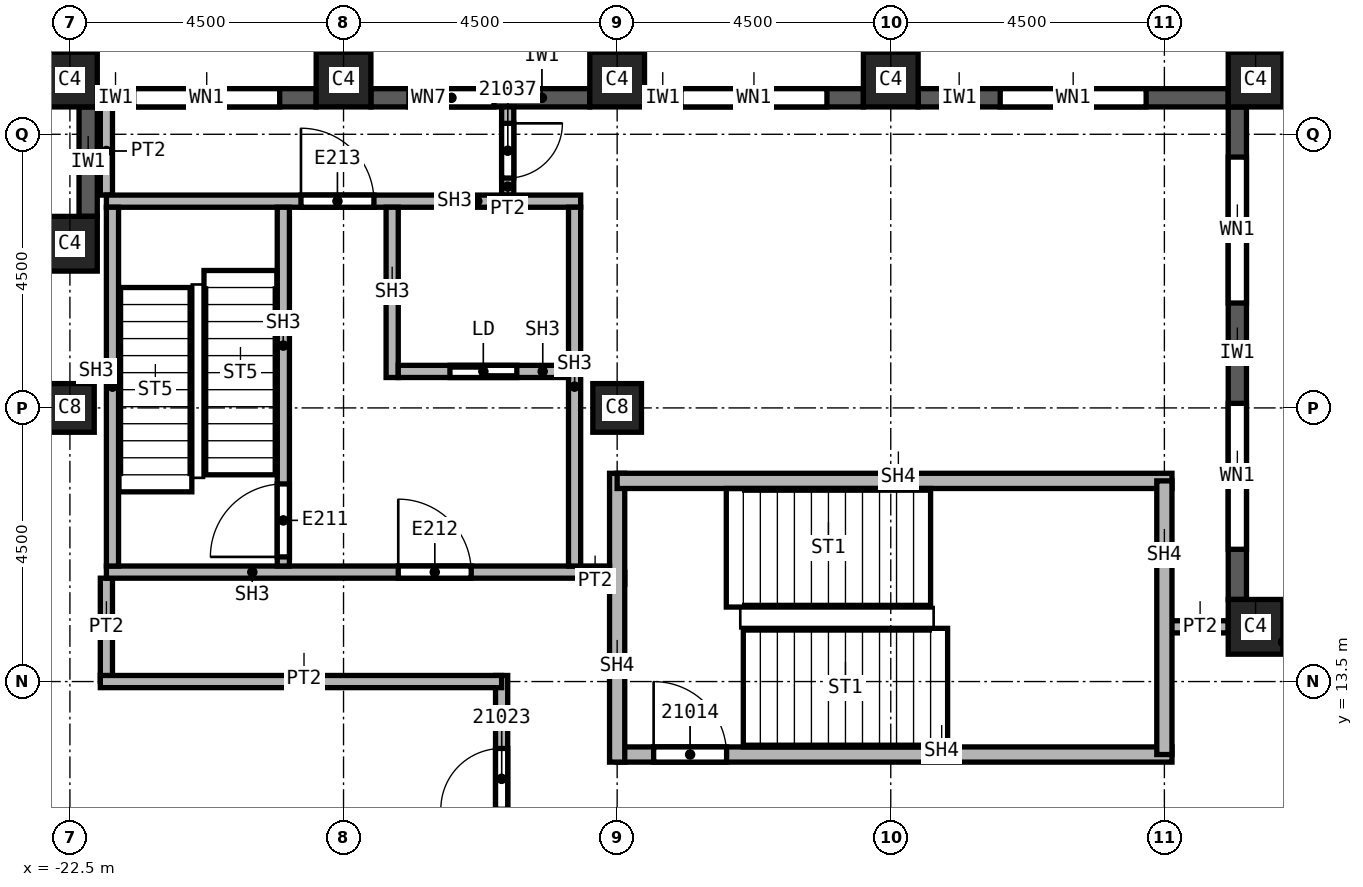
"""IFC4 building model, lengths in metres.
Left out: names, types, materials, properties, quantities, classifications, styles, units other than length and angle.
Written with IfcOpenShell. Run it as: python <this file> out.ifc"""

import sys

from ifc_helpers import new_model, si_unit, direction, frame, frame_2d, origin, origin_2d, place, context, subcontext, project, spatial, rectangle, extrude, element, fill, save


model = new_model("IFC4")
c1 = context("Model", 3, precision=1e-05, world=origin(), true_north=direction((0.0, 1.0)))
c2 = subcontext(c1, "Body", "Model", "MODEL_VIEW")
j1 = project(units=[si_unit("LENGTHUNIT", "METRE"), si_unit("PLANEANGLEUNIT", "RADIAN")], contexts=[c1])
p1 = place(None, origin())
s1 = spatial("IfcSite", under=j1, at=p1, CompositionType="ELEMENT")
p2 = place(p1, origin())
s2 = spatial("IfcBuilding", under=s1, at=p2, CompositionType="ELEMENT")
p3 = place(p2, frame((0.0, 0.0, 308.0)))
s3 = spatial("IfcBuildingStorey", under=s2, at=p3, CompositionType="ELEMENT", Elevation=308.0)
for number, where, z_axis, x_axis in (
    (1, (-13.5, 18.0, 0.0), (0.0, 0.0, 1.0), (1.0, 0.0, 0.0)),
    (2, (-22.5, 18.0, 0.0), (0.0, 0.0, 1.0), (1.0, 0.0, 0.0)),
):
    element("IfcColumn", number, at=place(p3, frame(where, z_axis=z_axis, x_axis=x_axis)), inside=s3, PredefinedType="COLUMN", context=c2, shape_type="SweptSolid", body=[
        extrude(rectangle(XDim=0.8, YDim=0.8, at=origin_2d()), origin(), (0.0, 0.0, 1.0), 3.74),
    ])
for number, where, z_axis, x_axis in (
    (3, (-3.0, 23.4, 0.0), (0.0, 0.0, 1.0), (1.0, 0.0, 0.0)),
    (4, (-9.0, 23.4, 0.0), (0.0, 0.0, 1.0), (1.0, 0.0, 0.0)),
    (5, (-13.5, 23.4, 0.0), (0.0, 0.0, 1.0), (1.0, 0.0, 0.0)),
    (6, (-18.0, 23.4, 0.0), (0.0, 0.0, 1.0), (1.0, 0.0, 0.0)),
    (7, (-22.5, 23.4, 0.0), (0.0, 0.0, 1.0), (1.0, 0.0, 0.0)),
    (8, (-3.0, 14.4, 0.0), (0.0, 0.0, 1.0), (1.0, 0.0, 0.0)),
    (9, (-22.5, 20.7, 0.0), (0.0, 0.0, 1.0), (1.0, 0.0, 0.0)),
):
    element("IfcColumn", number, at=place(p3, frame(where, z_axis=z_axis, x_axis=x_axis)), inside=s3, PredefinedType="COLUMN", context=c2, shape_type="SweptSolid", body=[
        extrude(rectangle(XDim=0.9, YDim=0.9, at=origin_2d()), origin(), (0.0, 0.0, 1.0), 3.74),
    ])
p4 = place(p3, frame((-3.3, 14.85, 0.0), z_axis=(0.0, 0.0, 1.0), x_axis=(0.0, 1.0, 0.0)))
e10 = element("IfcWall", 10, at=p4, inside=s3, PredefinedType="SOLIDWALL", context=c2, shape_type="SweptSolid", body=[
    extrude(rectangle(XDim=8.1, YDim=0.3, at=frame_2d((4.05, 0.0))), origin(), (0.0, 0.0, 1.0), 3.14),
])
p5 = place(p4, frame((0.825, 0.0, 0.8)))
e11 = element("IfcOpeningElement", 11, at=p5, cuts=e10, PredefinedType="OPENING", context=c2, shape_type="SweptSolid", body=[
    extrude(rectangle(XDim=2.4, YDim=1.95, at=frame_2d((1.2, 0.975))), frame((0.0, 0.15, 0.0), z_axis=(0.0, -1.0, 0.0), x_axis=(1.0, 0.0, 0.0)), (0.0, 0.0, 1.0), 0.3),
])
p6 = place(p4, frame((4.875, 0.0, 0.8)))
e12 = element("IfcOpeningElement", 12, at=p6, cuts=e10, PredefinedType="OPENING", context=c2, shape_type="SweptSolid", body=[
    extrude(rectangle(XDim=2.4, YDim=1.95, at=frame_2d((1.2, 0.975))), frame((0.0, 0.15, 0.0), z_axis=(0.0, -1.0, 0.0), x_axis=(1.0, 0.0, 0.0)), (0.0, 0.0, 1.0), 0.3),
])
p7 = place(p3, frame((-3.45, 23.1, 0.0), z_axis=(0.0, 0.0, 1.0), x_axis=(-1.0, 0.0, 0.0)))
e13 = element("IfcWall", 13, at=p7, inside=s3, PredefinedType="SOLIDWALL", context=c2, shape_type="SweptSolid", body=[
    extrude(rectangle(XDim=5.1, YDim=0.3, at=frame_2d((2.55, 0.0))), origin(), (0.0, 0.0, 1.0), 3.14),
])
p8 = place(p7, frame((1.35, 0.0, 0.8)))
e14 = element("IfcOpeningElement", 14, at=p8, cuts=e13, PredefinedType="OPENING", context=c2, shape_type="SweptSolid", body=[
    extrude(rectangle(XDim=2.4, YDim=1.95, at=frame_2d((1.2, 0.975))), frame((0.0, 0.15, 0.0), z_axis=(0.0, -1.0, 0.0), x_axis=(1.0, 0.0, 0.0)), (0.0, 0.0, 1.0), 0.3),
])
p9 = place(p3, frame((-9.45, 23.1, 0.0), z_axis=(0.0, 0.0, 1.0), x_axis=(-1.0, 0.0, 0.0)))
e15 = element("IfcWall", 15, at=p9, inside=s3, PredefinedType="SOLIDWALL", context=c2, shape_type="SweptSolid", body=[
    extrude(rectangle(XDim=3.6, YDim=0.3, at=frame_2d((1.8, 0.0))), origin(), (0.0, 0.0, 1.0), 3.14),
])
p10 = place(p9, frame((0.6, 0.0, 0.8)))
e16 = element("IfcOpeningElement", 16, at=p10, cuts=e15, PredefinedType="OPENING", context=c2, shape_type="SweptSolid", body=[
    extrude(rectangle(XDim=2.4, YDim=1.95, at=frame_2d((1.2, 0.975))), frame((0.0, 0.15, 0.0), z_axis=(0.0, -1.0, 0.0), x_axis=(1.0, 0.0, 0.0)), (0.0, 0.0, 1.0), 0.3),
])
p11 = place(p3, frame((-13.95, 23.1, 0.0), z_axis=(0.0, 0.0, 1.0), x_axis=(-1.0, 0.0, 0.0)))
e17 = element("IfcWall", 17, at=p11, inside=s3, PredefinedType="SOLIDWALL", context=c2, shape_type="SweptSolid", body=[
    extrude(rectangle(XDim=3.6, YDim=0.3, at=frame_2d((1.8, 0.0))), origin(), (0.0, 0.0, 1.0), 3.14),
])
p12 = place(p11, frame((1.575, 0.0, 0.8)))
e18 = element("IfcOpeningElement", 18, at=p12, cuts=e17, PredefinedType="OPENING", context=c2, shape_type="SweptSolid", body=[
    extrude(rectangle(XDim=1.4, YDim=1.95, at=frame_2d((0.7, 0.975))), frame((0.0, 0.15, 0.0), z_axis=(0.0, -1.0, 0.0), x_axis=(1.0, 0.0, 0.0)), (0.0, 0.0, 1.0), 0.3),
])
p13 = place(p3, frame((-18.45, 23.1, 0.0), z_axis=(0.0, 0.0, 1.0), x_axis=(-1.0, 0.0, 0.0)))
e19 = element("IfcWall", 19, at=p13, inside=s3, PredefinedType="SOLIDWALL", context=c2, shape_type="SweptSolid", body=[
    extrude(rectangle(XDim=3.6, YDim=0.3, at=frame_2d((1.8, 0.0))), origin(), (0.0, 0.0, 1.0), 3.14),
])
p14 = place(p13, frame((0.6, 0.0, 0.8)))
e20 = element("IfcOpeningElement", 20, at=p14, cuts=e19, PredefinedType="OPENING", context=c2, shape_type="SweptSolid", body=[
    extrude(rectangle(XDim=2.4, YDim=1.95, at=frame_2d((1.2, 0.975))), frame((0.0, 0.15, 0.0), z_axis=(0.0, -1.0, 0.0), x_axis=(1.0, 0.0, 0.0)), (0.0, 0.0, 1.0), 0.3),
])
p15 = place(p3, frame((-22.2, 22.95, 0.0), z_axis=(0.0, 0.0, 1.0), x_axis=(0.0, -1.0, 0.0)))
e21 = element("IfcWall", 21, at=p15, inside=s3, PredefinedType="SOLIDWALL", context=c2, shape_type="SweptSolid", body=[
    extrude(rectangle(XDim=1.8, YDim=0.3, at=frame_2d((0.9, 0.0))), origin(), (0.0, 0.0, 1.0), 3.14),
])
p16 = place(p3, frame((-21.9, 13.5, 0.0), z_axis=(0.0, 0.0, 1.0), x_axis=(0.0, 1.0, 0.0)))
e22 = element("IfcWall", 22, at=p16, inside=s3, PredefinedType="PARTITIONING", context=c2, shape_type="SweptSolid", body=[
    extrude(rectangle(XDim=1.7, YDim=0.2, at=frame_2d((0.85, 0.0))), origin(), (0.0, 0.0, 1.0), 3.74),
])
p17 = place(p3, frame((-21.9, 21.5, 0.0), z_axis=(0.0, 0.0, 1.0), x_axis=(0.0, 1.0, 0.0)))
e23 = element("IfcWall", 23, at=p17, inside=s3, PredefinedType="PARTITIONING", context=c2, shape_type="SweptSolid", body=[
    extrude(rectangle(XDim=1.45, YDim=0.2, at=frame_2d((0.725, 0.0))), origin(), (0.0, 0.0, 1.0), 3.74),
])
p18 = place(p3, frame((-15.4, -22.95, 0.0), z_axis=(0.0, 0.0, 1.0), x_axis=(0.0, 1.0, 0.0)))
e24 = element("IfcWall", 24, at=p18, inside=s3, PredefinedType="PARTITIONING", context=c2, shape_type="SweptSolid", body=[
    extrude(rectangle(XDim=36.55, YDim=0.2, at=frame_2d((18.275, 0.0))), origin(), (0.0, 0.0, 1.0), 3.74),
])
p19 = place(p18, frame((23.1, 0.0, 0.0)))
e25 = element("IfcOpeningElement", 25, at=p19, cuts=e24, PredefinedType="OPENING", context=c2, shape_type="SweptSolid", body=[
    extrude(rectangle(XDim=1.0, YDim=2.1, at=frame_2d((0.5, 1.05))), frame((0.0, 0.1, 0.0), z_axis=(0.0, -1.0, 0.0), x_axis=(1.0, 0.0, 0.0)), (0.0, 0.0, 1.0), 0.2),
])
p20 = place(p18, frame((34.35, 0.0, 0.0)))
e26 = element("IfcOpeningElement", 26, at=p20, cuts=e24, PredefinedType="OPENING", context=c2, shape_type="SweptSolid", body=[
    extrude(rectangle(XDim=1.0, YDim=2.1, at=frame_2d((0.5, 1.05))), frame((0.0, 0.1, 0.0), z_axis=(0.0, -1.0, 0.0), x_axis=(1.0, 0.0, 0.0)), (0.0, 0.0, 1.0), 0.2),
])
p21 = place(p18, frame((2.95, 0.0, 0.0)))
e27 = element("IfcOpeningElement", 27, at=p21, cuts=e24, PredefinedType="OPENING", context=c2, shape_type="SweptSolid", body=[
    extrude(rectangle(XDim=1.0, YDim=2.1, at=frame_2d((0.5, 1.05))), frame((0.0, 0.1, 0.0), z_axis=(0.0, -1.0, 0.0), x_axis=(1.0, 0.0, 0.0)), (0.0, 0.0, 1.0), 0.2),
])
p22 = place(p18, frame((6.15, 0.0, 0.0)))
e28 = element("IfcOpeningElement", 28, at=p22, cuts=e24, PredefinedType="OPENING", context=c2, shape_type="SweptSolid", body=[
    extrude(rectangle(XDim=1.0, YDim=2.1, at=frame_2d((0.5, 1.05))), frame((0.0, 0.1, 0.0), z_axis=(0.0, -1.0, 0.0), x_axis=(1.0, 0.0, 0.0)), (0.0, 0.0, 1.0), 0.2),
])
p23 = place(p18, frame((8.625, 0.0, 0.0)))
e29 = element("IfcOpeningElement", 29, at=p23, cuts=e24, PredefinedType="OPENING", context=c2, shape_type="SweptSolid", body=[
    extrude(rectangle(XDim=1.0, YDim=2.1, at=frame_2d((0.5, 1.05))), frame((0.0, 0.1, 0.0), z_axis=(0.0, -1.0, 0.0), x_axis=(1.0, 0.0, 0.0)), (0.0, 0.0, 1.0), 0.2),
])
p24 = place(p18, frame((15.0, 0.0, 0.0)))
e30 = element("IfcOpeningElement", 30, at=p24, cuts=e24, PredefinedType="OPENING", context=c2, shape_type="SweptSolid", body=[
    extrude(rectangle(XDim=1.0, YDim=2.1, at=frame_2d((0.5, 1.05))), frame((0.0, 0.1, 0.0), z_axis=(0.0, -1.0, 0.0), x_axis=(1.0, 0.0, 0.0)), (0.0, 0.0, 1.0), 0.2),
])
p25 = place(p3, frame((-15.4, 13.5, 0.0), z_axis=(0.0, 0.0, 1.0), x_axis=(-1.0, 0.0, 0.0)))
e31 = element("IfcWall", 31, at=p25, inside=s3, PredefinedType="PARTITIONING", context=c2, shape_type="SweptSolid", body=[
    extrude(rectangle(XDim=6.6, YDim=0.2, at=frame_2d((3.3, 0.0))), origin(), (0.0, 0.0, 1.0), 3.74),
])
p26 = place(p3, frame((-15.3, 22.95, 0.0), z_axis=(0.0, 0.0, 1.0), x_axis=(0.0, -1.0, 0.0)))
e32 = element("IfcWall", 32, at=p26, inside=s3, PredefinedType="PARTITIONING", context=c2, shape_type="SweptSolid", body=[
    extrude(rectangle(XDim=1.45, YDim=0.2, at=frame_2d((0.725, 0.0))), origin(), (0.0, 0.0, 1.0), 3.74),
])
p27 = place(p26, frame((0.27, 0.0, 0.0)))
e33 = element("IfcOpeningElement", 33, at=p27, cuts=e32, PredefinedType="OPENING", context=c2, shape_type="SweptSolid", body=[
    extrude(rectangle(XDim=0.9, YDim=2.1, at=frame_2d((0.45, 1.05))), frame((0.0, 0.1, 0.0), z_axis=(0.0, -1.0, 0.0), x_axis=(1.0, 0.0, 0.0)), (0.0, 0.0, 1.0), 0.2),
])
p28 = place(p3, frame((-14.1, 15.2, 0.0), z_axis=(0.0, 0.0, 1.0), x_axis=(1.0, 0.0, 0.0)))
e34 = element("IfcWall", 34, at=p28, inside=s3, PredefinedType="PARTITIONING", context=c2, shape_type="SweptSolid", body=[
    extrude(rectangle(XDim=0.725, YDim=0.2, at=frame_2d((0.363, 0.0))), origin(), (0.0, 0.0, 1.0), 3.74),
])
p29 = place(p3, frame((-4.5, 14.4, 0.0), z_axis=(0.0, 0.0, 1.0), x_axis=(1.0, 0.0, 0.0)))
e35 = element("IfcWall", 35, at=p29, inside=s3, PredefinedType="PARTITIONING", context=c2, shape_type="SweptSolid", body=[
    extrude(rectangle(XDim=1.05, YDim=0.2, at=frame_2d((0.525, 0.0))), origin(), (0.0, 0.0, 1.0), 3.74),
])
p30 = place(p3, frame((-13.5, 12.3, 0.0), z_axis=(0.0, 0.0, 1.0), x_axis=(1.0, 0.0, 0.0)))
e36 = element("IfcWall", 36, at=p30, inside=s3, PredefinedType="SOLIDWALL", context=c2, shape_type="SweptSolid", body=[
    extrude(rectangle(XDim=9.125, YDim=0.25, at=frame_2d((4.562, 0.0))), origin(), (0.0, 0.0, 1.0), 3.74),
])
p31 = place(p30, frame((0.6, 0.0, 0.0)))
e37 = element("IfcOpeningElement", 37, at=p31, cuts=e36, PredefinedType="OPENING", context=c2, shape_type="SweptSolid", body=[
    extrude(rectangle(XDim=1.2, YDim=2.1, at=frame_2d((0.6, 1.05))), frame((0.0, 0.125, 0.0), z_axis=(0.0, -1.0, 0.0), x_axis=(1.0, 0.0, 0.0)), (0.0, 0.0, 1.0), 0.25),
])
p32 = place(p3, frame((-13.5, 12.175, 0.0), z_axis=(0.0, 0.0, 1.0), x_axis=(0.0, 1.0, 0.0)))
e38 = element("IfcWall", 38, at=p32, inside=s3, PredefinedType="SOLIDWALL", context=c2, shape_type="SweptSolid", body=[
    extrude(rectangle(XDim=4.75, YDim=0.25, at=frame_2d((2.375, 0.0))), origin(), (0.0, 0.0, 1.0), 3.74),
])
p33 = place(p3, frame((-13.5, 16.8, 0.0), z_axis=(0.0, 0.0, 1.0), x_axis=(1.0, 0.0, 0.0)))
e39 = element("IfcWall", 39, at=p33, inside=s3, PredefinedType="SOLIDWALL", context=c2, shape_type="SweptSolid", body=[
    extrude(rectangle(XDim=9.125, YDim=0.25, at=frame_2d((4.562, 0.0))), origin(), (0.0, 0.0, 1.0), 3.74),
])
p34 = place(p3, frame((-4.5, 16.8, 0.0), z_axis=(0.0, 0.0, 1.0), x_axis=(0.0, -1.0, 0.0)))
e40 = element("IfcWall", 40, at=p34, inside=s3, PredefinedType="SOLIDWALL", context=c2, shape_type="SweptSolid", body=[
    extrude(rectangle(XDim=4.5, YDim=0.25, at=frame_2d((2.25, 0.0))), origin(), (0.0, 0.0, 1.0), 3.74),
])
p35 = place(p3, frame((-21.9, 15.3, 0.0), z_axis=(0.0, 0.0, 1.0), x_axis=(1.0, 0.0, 0.0)))
e41 = element("IfcWall", 41, at=p35, inside=s3, PredefinedType="SOLIDWALL", context=c2, shape_type="SweptSolid", body=[
    extrude(rectangle(XDim=8.275, YDim=0.2, at=frame_2d((4.137, 0.0))), origin(), (0.0, 0.0, 1.0), 3.74),
])
p36 = place(p35, frame((4.8, 0.0, 0.0)))
e42 = element("IfcOpeningElement", 42, at=p36, cuts=e41, PredefinedType="OPENING", context=c2, shape_type="SweptSolid", body=[
    extrude(rectangle(XDim=1.2, YDim=2.1, at=frame_2d((0.6, 1.05))), frame((0.0, 0.1, 0.0), z_axis=(0.0, -1.0, 0.0), x_axis=(1.0, 0.0, 0.0)), (0.0, 0.0, 1.0), 0.2),
])
p37 = place(p3, frame((-21.9, 21.4, 0.0), z_axis=(0.0, 0.0, 1.0), x_axis=(1.0, 0.0, 0.0)))
e43 = element("IfcWall", 43, at=p37, inside=s3, PredefinedType="SOLIDWALL", context=c2, shape_type="SweptSolid", body=[
    extrude(rectangle(XDim=7.8, YDim=0.2, at=frame_2d((3.9, 0.0))), origin(), (0.0, 0.0, 1.0), 3.74),
])
p38 = place(p37, frame((3.2, 0.0, 0.0)))
e44 = element("IfcOpeningElement", 44, at=p38, cuts=e43, PredefinedType="OPENING", context=c2, shape_type="SweptSolid", body=[
    extrude(rectangle(XDim=1.2, YDim=2.1, at=frame_2d((0.6, 1.05))), frame((0.0, 0.1, 0.0), z_axis=(0.0, -1.0, 0.0), x_axis=(1.0, 0.0, 0.0)), (0.0, 0.0, 1.0), 0.2),
])
for number, where, z_axis, x_axis in (
    (45, (-21.8, 15.4, 0.0), (0.0, 0.0, 1.0), (0.0, 1.0, 0.0)),
    (46, (-14.2, 15.4, 0.0), (0.0, 0.0, 1.0), (0.0, 1.0, 0.0)),
):
    element("IfcWall", number, at=place(p3, frame(where, z_axis=z_axis, x_axis=x_axis)), inside=s3, PredefinedType="SOLIDWALL", context=c2, shape_type="SweptSolid", body=[
        extrude(rectangle(XDim=5.9, YDim=0.2, at=frame_2d((2.95, 0.0))), origin(), (0.0, 0.0, 1.0), 3.74),
    ])
p39 = place(p3, frame((-18.99, 15.4, 0.0), z_axis=(0.0, 0.0, 1.0), x_axis=(0.0, 1.0, 0.0)))
e47 = element("IfcWall", 47, at=p39, inside=s3, PredefinedType="SOLIDWALL", context=c2, shape_type="SweptSolid", body=[
    extrude(rectangle(XDim=5.9, YDim=0.2, at=frame_2d((2.95, 0.0))), origin(), (0.0, 0.0, 1.0), 3.74),
])
p40 = place(p39, frame((0.15, 0.0, 0.0)))
e48 = element("IfcOpeningElement", 48, at=p40, cuts=e47, PredefinedType="OPENING", context=c2, shape_type="SweptSolid", body=[
    extrude(rectangle(XDim=1.2, YDim=2.1, at=frame_2d((0.6, 1.05))), frame((0.0, 0.1, 0.0), z_axis=(0.0, -1.0, 0.0), x_axis=(1.0, 0.0, 0.0)), (0.0, 0.0, 1.0), 0.2),
])
p41 = place(p3, frame((-17.2, 18.5, 0.0), z_axis=(0.0, 0.0, 1.0), x_axis=(0.0, 1.0, 0.0)))
e49 = element("IfcWall", 49, at=p41, inside=s3, PredefinedType="SOLIDWALL", context=c2, shape_type="SweptSolid", body=[
    extrude(rectangle(XDim=2.8, YDim=0.2, at=frame_2d((1.4, 0.0))), origin(), (0.0, 0.0, 1.0), 3.74),
])
p42 = place(p3, frame((-17.1, 18.6, 0.0), z_axis=(0.0, 0.0, 1.0), x_axis=(1.0, 0.0, 0.0)))
e50 = element("IfcWall", 50, at=p42, inside=s3, PredefinedType="SOLIDWALL", context=c2, shape_type="SweptSolid", body=[
    extrude(rectangle(XDim=2.8, YDim=0.2, at=frame_2d((1.4, 0.0))), origin(), (0.0, 0.0, 1.0), 3.74),
])
p43 = place(p42, frame((0.85, 0.0, 0.0)))
e51 = element("IfcOpeningElement", 51, at=p43, cuts=e50, PredefinedType="OPENING", context=c2, shape_type="SweptSolid", body=[
    extrude(rectangle(XDim=1.1, YDim=2.1, at=frame_2d((0.55, 1.05))), frame((0.0, 0.1, 0.0), z_axis=(0.0, -1.0, 0.0), x_axis=(1.0, 0.0, 0.0)), (0.0, 0.0, 1.0), 0.2),
])
p44 = place(p5, origin())
e52 = element("IfcWindow", 52, at=p44, inside=s3, PartitioningType="SINGLE_PANEL", PredefinedType="WINDOW", context=c2, shape_type="SweptSolid", body=[
    extrude(rectangle(XDim=2.4, YDim=1.95, at=frame_2d((1.2, 0.975))), frame((0.0, 0.03, 0.0), z_axis=(0.0, -1.0, 0.0), x_axis=(1.0, 0.0, 0.0)), (0.0, 0.0, 1.0), 0.06),
])
fill(e11, e52)
p45 = place(p6, origin())
e53 = element("IfcWindow", 53, at=p45, inside=s3, PartitioningType="SINGLE_PANEL", PredefinedType="WINDOW", context=c2, shape_type="SweptSolid", body=[
    extrude(rectangle(XDim=2.4, YDim=1.95, at=frame_2d((1.2, 0.975))), frame((0.0, 0.03, 0.0), z_axis=(0.0, -1.0, 0.0), x_axis=(1.0, 0.0, 0.0)), (0.0, 0.0, 1.0), 0.06),
])
fill(e12, e53)
p46 = place(p8, origin())
e54 = element("IfcWindow", 54, at=p46, inside=s3, PartitioningType="SINGLE_PANEL", PredefinedType="WINDOW", context=c2, shape_type="SweptSolid", body=[
    extrude(rectangle(XDim=2.4, YDim=1.95, at=frame_2d((1.2, 0.975))), frame((0.0, 0.03, 0.0), z_axis=(0.0, -1.0, 0.0), x_axis=(1.0, 0.0, 0.0)), (0.0, 0.0, 1.0), 0.06),
])
fill(e14, e54)
p47 = place(p10, origin())
e55 = element("IfcWindow", 55, at=p47, inside=s3, PartitioningType="SINGLE_PANEL", PredefinedType="WINDOW", context=c2, shape_type="SweptSolid", body=[
    extrude(rectangle(XDim=2.4, YDim=1.95, at=frame_2d((1.2, 0.975))), frame((0.0, 0.03, 0.0), z_axis=(0.0, -1.0, 0.0), x_axis=(1.0, 0.0, 0.0)), (0.0, 0.0, 1.0), 0.06),
])
fill(e16, e55)
p48 = place(p14, origin())
e56 = element("IfcWindow", 56, at=p48, inside=s3, PartitioningType="SINGLE_PANEL", PredefinedType="WINDOW", context=c2, shape_type="SweptSolid", body=[
    extrude(rectangle(XDim=2.4, YDim=1.95, at=frame_2d((1.2, 0.975))), frame((0.0, 0.03, 0.0), z_axis=(0.0, -1.0, 0.0), x_axis=(1.0, 0.0, 0.0)), (0.0, 0.0, 1.0), 0.06),
])
fill(e20, e56)
p49 = place(p31, origin())
e57 = element("IfcDoor", 57, at=p49, inside=s3, OperationType="SINGLE_SWING_LEFT", PredefinedType="DOOR", context=c2, shape_type="SweptSolid", body=[
    extrude(rectangle(XDim=1.2, YDim=2.1, at=frame_2d((0.6, 1.05))), frame((0.0, 0.025, 0.0), z_axis=(0.0, -1.0, 0.0), x_axis=(1.0, 0.0, 0.0)), (0.0, 0.0, 1.0), 0.05),
])
fill(e37, e57)
p50 = place(p20, origin())
e58 = element("IfcDoor", 58, at=p50, inside=s3, OperationType="SINGLE_SWING_RIGHT", PredefinedType="DOOR", context=c2, shape_type="SweptSolid", body=[
    extrude(rectangle(XDim=1.0, YDim=2.1, at=frame_2d((0.5, 1.05))), frame((0.0, 0.025, 0.0), z_axis=(0.0, -1.0, 0.0), x_axis=(1.0, 0.0, 0.0)), (0.0, 0.0, 1.0), 0.05),
])
fill(e26, e58)
p51 = place(p27, origin())
e59 = element("IfcDoor", 59, at=p51, inside=s3, OperationType="SINGLE_SWING_LEFT", PredefinedType="DOOR", context=c2, shape_type="SweptSolid", body=[
    extrude(rectangle(XDim=0.9, YDim=2.1, at=frame_2d((0.45, 1.05))), frame((0.0, 0.025, 0.0), z_axis=(0.0, -1.0, 0.0), x_axis=(1.0, 0.0, 0.0)), (0.0, 0.0, 1.0), 0.05),
])
fill(e33, e59)
p52 = place(p40, origin())
e60 = element("IfcDoor", 60, at=p52, inside=s3, OperationType="SINGLE_SWING_LEFT", PredefinedType="DOOR", context=c2, shape_type="SweptSolid", body=[
    extrude(rectangle(XDim=1.2, YDim=2.1, at=frame_2d((0.6, 1.05))), frame((0.0, 0.025, 0.0), z_axis=(0.0, -1.0, 0.0), x_axis=(1.0, 0.0, 0.0)), (0.0, 0.0, 1.0), 0.05),
])
fill(e48, e60)
p53 = place(p43, origin())
e61 = element("IfcDoor", 61, at=p53, inside=s3, OperationType="SLIDING_TO_LEFT", PredefinedType="DOOR", context=c2, shape_type="SweptSolid", body=[
    extrude(rectangle(XDim=1.1, YDim=2.1, at=frame_2d((0.55, 1.05))), frame((0.0, 0.025, 0.0), z_axis=(0.0, -1.0, 0.0), x_axis=(1.0, 0.0, 0.0)), (0.0, 0.0, 1.0), 0.05),
])
fill(e51, e61)
p54 = place(p36, origin())
e62 = element("IfcDoor", 62, at=p54, inside=s3, OperationType="SINGLE_SWING_RIGHT", PredefinedType="DOOR", context=c2, shape_type="SweptSolid", body=[
    extrude(rectangle(XDim=1.2, YDim=2.1, at=frame_2d((0.6, 1.05))), frame((0.0, 0.025, 0.0), z_axis=(0.0, -1.0, 0.0), x_axis=(1.0, 0.0, 0.0)), (0.0, 0.0, 1.0), 0.05),
])
fill(e42, e62)
p55 = place(p38, origin())
e63 = element("IfcDoor", 63, at=p55, inside=s3, OperationType="SINGLE_SWING_LEFT", PredefinedType="DOOR", context=c2, shape_type="SweptSolid", body=[
    extrude(rectangle(XDim=1.2, YDim=2.1, at=frame_2d((0.6, 1.05))), frame((0.0, 0.025, 0.0), z_axis=(0.0, -1.0, 0.0), x_axis=(1.0, 0.0, 0.0)), (0.0, 0.0, 1.0), 0.05),
])
fill(e44, e63)
p56 = place(p12, origin())
e64 = element("IfcWindow", 64, at=p56, inside=s3, PartitioningType="SINGLE_PANEL", PredefinedType="WINDOW", context=c2, shape_type="SweptSolid", body=[
    extrude(rectangle(XDim=1.4, YDim=1.95, at=frame_2d((0.7, 0.975))), frame((0.0, 0.03, 0.0), z_axis=(0.0, -1.0, 0.0), x_axis=(1.0, 0.0, 0.0)), (0.0, 0.0, 1.0), 0.06),
])
fill(e18, e64)
save(model, sys.argv[1])
